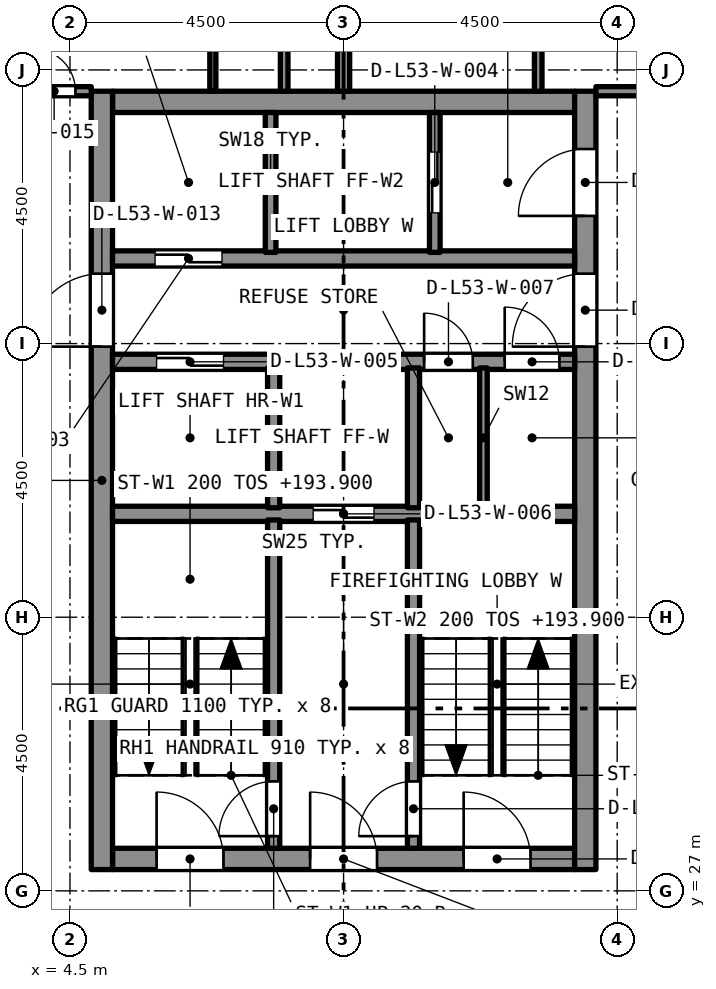
"""IFC4 building model, lengths in metres.
Left out: names, types, materials, properties, quantities, classifications, styles, units other than length and angle.
Written with IfcOpenShell. Run it as: python <this file> out.ifc"""

import sys

from ifc_helpers import new_model, si_unit, direction, frame, frame_2d, origin, place, context, subcontext, project, spatial, rectangle, extrude, element, fill, save


model = new_model("IFC4")
c1 = context("Model", 3, precision=1e-05, world=origin(), true_north=direction((0.0, 1.0)))
c2 = subcontext(c1, "Body", "Model", "MODEL_VIEW")
j1 = project(units=[si_unit("LENGTHUNIT", "METRE"), si_unit("PLANEANGLEUNIT", "RADIAN")], contexts=[c1])
p1 = place(None, origin())
s1 = spatial("IfcSite", under=j1, at=p1, CompositionType="ELEMENT")
p2 = place(p1, origin())
s2 = spatial("IfcBuilding", under=s1, at=p2, CompositionType="ELEMENT")
p3 = place(p2, frame((0.0, 0.0, 192.3)))
s3 = spatial("IfcBuildingStorey", under=s2, at=p3, CompositionType="ELEMENT", Elevation=192.3)
p4 = place(p3, frame((5.2, 27.525, 0.0), z_axis=(0.0, 0.0, 1.0), x_axis=(1.0, 0.0, 0.0)))
e1 = element("IfcWall", 1, at=p4, inside=s3, PredefinedType="SOLIDWALL", context=c2, shape_type="SweptSolid", body=[
    extrude(rectangle(XDim=7.6, YDim=0.35, at=frame_2d((3.8, 0.0))), origin(), (0.0, 0.0, 1.0), 3.2),
])
p5 = place(p4, frame((0.725, 0.0, 0.0)))
e2 = element("IfcOpeningElement", 2, at=p5, cuts=e1, PredefinedType="OPENING", context=c2, shape_type="SweptSolid", body=[
    extrude(rectangle(XDim=1.1, YDim=2.1, at=frame_2d((0.55, 1.05))), frame((0.0, 0.185, 0.0), z_axis=(0.0, -1.0, 0.0), x_axis=(1.0, 0.0, 0.0)), (0.0, 0.0, 1.0), 0.37),
])
p6 = place(p4, frame((3.25, 0.0, 0.0)))
e3 = element("IfcOpeningElement", 3, at=p6, cuts=e1, PredefinedType="OPENING", context=c2, shape_type="SweptSolid", body=[
    extrude(rectangle(XDim=1.1, YDim=2.1, at=frame_2d((0.55, 1.05))), frame((0.0, 0.185, 0.0), z_axis=(0.0, -1.0, 0.0), x_axis=(1.0, 0.0, 0.0)), (0.0, 0.0, 1.0), 0.37),
])
p7 = place(p4, frame((5.775, 0.0, 0.0)))
e4 = element("IfcOpeningElement", 4, at=p7, cuts=e1, PredefinedType="OPENING", context=c2, shape_type="SweptSolid", body=[
    extrude(rectangle(XDim=1.1, YDim=2.1, at=frame_2d((0.55, 1.05))), frame((0.0, 0.185, 0.0), z_axis=(0.0, -1.0, 0.0), x_axis=(1.0, 0.0, 0.0)), (0.0, 0.0, 1.0), 0.37),
])
p8 = place(p3, frame((5.2, 39.975, 0.0), z_axis=(0.0, 0.0, 1.0), x_axis=(1.0, 0.0, 0.0)))
e5 = element("IfcWall", 5, at=p8, inside=s3, PredefinedType="SOLIDWALL", context=c2, shape_type="SweptSolid", body=[
    extrude(rectangle(XDim=7.6, YDim=0.35, at=frame_2d((3.8, 0.0))), origin(), (0.0, 0.0, 1.0), 3.2),
])
p9 = place(p3, frame((5.025, 27.35, 0.0), z_axis=(0.0, 0.0, 1.0), x_axis=(0.0, 1.0, 0.0)))
e6 = element("IfcWall", 6, at=p9, inside=s3, PredefinedType="SOLIDWALL", context=c2, shape_type="SweptSolid", body=[
    extrude(rectangle(XDim=12.8, YDim=0.35, at=frame_2d((6.4, 0.0))), origin(), (0.0, 0.0, 1.0), 3.2),
])
p10 = place(p9, frame((8.6, 0.0, 0.0)))
e7 = element("IfcOpeningElement", 7, at=p10, cuts=e6, PredefinedType="OPENING", context=c2, shape_type="SweptSolid", body=[
    extrude(rectangle(XDim=1.2, YDim=2.1, at=frame_2d((0.6, 1.05))), frame((0.0, 0.185, 0.0), z_axis=(0.0, -1.0, 0.0), x_axis=(1.0, 0.0, 0.0)), (0.0, 0.0, 1.0), 0.37),
])
p11 = place(p3, frame((12.975, 27.35, 0.0), z_axis=(0.0, 0.0, 1.0), x_axis=(0.0, 1.0, 0.0)))
e8 = element("IfcWall", 8, at=p11, inside=s3, PredefinedType="SOLIDWALL", context=c2, shape_type="SweptSolid", body=[
    extrude(rectangle(XDim=12.8, YDim=0.35, at=frame_2d((6.4, 0.0))), origin(), (0.0, 0.0, 1.0), 3.2),
])
p12 = place(p11, frame((10.75, 0.0, 0.0)))
e9 = element("IfcOpeningElement", 9, at=p12, cuts=e8, PredefinedType="OPENING", context=c2, shape_type="SweptSolid", body=[
    extrude(rectangle(XDim=1.1, YDim=2.1, at=frame_2d((0.55, 1.05))), frame((0.0, 0.185, 0.0), z_axis=(0.0, -1.0, 0.0), x_axis=(1.0, 0.0, 0.0)), (0.0, 0.0, 1.0), 0.37),
])
p13 = place(p11, frame((8.6, 0.0, 0.0)))
e10 = element("IfcOpeningElement", 10, at=p13, cuts=e8, PredefinedType="OPENING", context=c2, shape_type="SweptSolid", body=[
    extrude(rectangle(XDim=1.2, YDim=2.1, at=frame_2d((0.6, 1.05))), frame((0.0, 0.185, 0.0), z_axis=(0.0, -1.0, 0.0), x_axis=(1.0, 0.0, 0.0)), (0.0, 0.0, 1.0), 0.37),
])
p14 = place(p3, frame((8.023, 40.15, 0.0), z_axis=(0.0, 0.0, 1.0), x_axis=(0.0, 1.0, 0.0)))
e11 = element("IfcWall", 11, at=p14, inside=s3, PredefinedType="PARTITIONING", context=c2, shape_type="SweptSolid", body=[
    extrude(rectangle(XDim=3.408, YDim=0.125, at=frame_2d((1.704, 0.0))), origin(), (0.0, 0.0, 1.0), 2.9),
])
p15 = place(p3, frame((9.0, 40.15, 0.0), z_axis=(0.0, 0.0, 1.0), x_axis=(0.0, 1.0, 0.0)))
e12 = element("IfcWall", 12, at=p15, inside=s3, PredefinedType="PARTITIONING", context=c2, shape_type="SweptSolid", body=[
    extrude(rectangle(XDim=3.47, YDim=0.2, at=frame_2d((1.735, 0.0))), origin(), (0.0, 0.0, 1.0), 2.9),
])
p16 = place(p3, frame((6.85, 40.15, 0.0), z_axis=(0.0, 0.0, 1.0), x_axis=(0.0, 1.0, 0.0)))
e13 = element("IfcWall", 13, at=p16, inside=s3, PredefinedType="PARTITIONING", context=c2, shape_type="SweptSolid", body=[
    extrude(rectangle(XDim=3.42, YDim=0.1, at=frame_2d((1.71, 0.0))), origin(), (0.0, 0.0, 1.0), 2.9),
])
p17 = place(p3, frame((3.65, 40.15, 0.0), z_axis=(0.0, 0.0, 1.0), x_axis=(1.0, 0.0, 0.0)))
e14 = element("IfcWall", 14, at=p17, inside=s3, PredefinedType="PARTITIONING", context=c2, shape_type="SweptSolid", body=[
    extrude(rectangle(XDim=1.2, YDim=0.15, at=frame_2d((0.6, 0.0))), origin(), (0.0, 0.0, 1.0), 2.9),
])
p18 = place(p17, frame((0.24, 0.0, 0.0)))
e15 = element("IfcOpeningElement", 15, at=p18, cuts=e14, PredefinedType="OPENING", context=c2, shape_type="SweptSolid", body=[
    extrude(rectangle(XDim=0.7, YDim=2.1, at=frame_2d((0.35, 1.05))), frame((0.0, 0.085, 0.0), z_axis=(0.0, -1.0, 0.0), x_axis=(1.0, 0.0, 0.0)), (0.0, 0.0, 1.0), 0.17),
])
p19 = place(p3, frame((12.201, 40.15, 0.0), z_axis=(0.0, 0.0, 1.0), x_axis=(0.0, 1.0, 0.0)))
e16 = element("IfcWall", 16, at=p19, inside=s3, PredefinedType="PARTITIONING", context=c2, shape_type="SweptSolid", body=[
    extrude(rectangle(XDim=3.528, YDim=0.125, at=frame_2d((1.764, 0.0))), origin(), (0.0, 0.0, 1.0), 2.9),
])
p20 = place(p3, frame((13.15, 40.15, 0.0), z_axis=(0.0, 0.0, 1.0), x_axis=(1.0, 0.0, 0.0)))
e17 = element("IfcWall", 17, at=p20, inside=s3, PredefinedType="PARTITIONING", context=c2, shape_type="SweptSolid", body=[
    extrude(rectangle(XDim=1.8, YDim=0.15, at=frame_2d((0.9, 0.0))), origin(), (0.0, 0.0, 1.0), 2.9),
])
p21 = place(p3, frame((5.2, 33.2, 0.0), z_axis=(0.0, 0.0, 1.0), x_axis=(1.0, 0.0, 0.0)))
e18 = element("IfcWall", 18, at=p21, inside=s3, PredefinedType="SOLIDWALL", context=c2, shape_type="SweptSolid", body=[
    extrude(rectangle(XDim=7.6, YDim=0.25, at=frame_2d((3.8, 0.0))), origin(), (0.0, 0.0, 1.0), 2.9),
])
p22 = place(p21, frame((3.3, 0.0, 0.0)))
e19 = element("IfcOpeningElement", 19, at=p22, cuts=e18, PredefinedType="OPENING", context=c2, shape_type="SweptSolid", body=[
    extrude(rectangle(XDim=1.0, YDim=2.1, at=frame_2d((0.5, 1.05))), frame((0.0, 0.135, 0.0), z_axis=(0.0, -1.0, 0.0), x_axis=(1.0, 0.0, 0.0)), (0.0, 0.0, 1.0), 0.27),
])
p23 = place(p3, frame((5.2, 35.7, 0.0), z_axis=(0.0, 0.0, 1.0), x_axis=(1.0, 0.0, 0.0)))
e20 = element("IfcWall", 20, at=p23, inside=s3, PredefinedType="SOLIDWALL", context=c2, shape_type="SweptSolid", body=[
    extrude(rectangle(XDim=7.6, YDim=0.25, at=frame_2d((3.8, 0.0))), origin(), (0.0, 0.0, 1.0), 2.9),
])
p24 = place(p23, frame((0.725, 0.0, 0.0)))
e21 = element("IfcOpeningElement", 21, at=p24, cuts=e20, PredefinedType="OPENING", context=c2, shape_type="SweptSolid", body=[
    extrude(rectangle(XDim=1.1, YDim=2.4, at=frame_2d((0.55, 1.2))), frame((0.0, 0.135, 0.0), z_axis=(0.0, -1.0, 0.0), x_axis=(1.0, 0.0, 0.0)), (0.0, 0.0, 1.0), 0.27),
])
p25 = place(p23, frame((5.125, 0.0, 0.0)))
e22 = element("IfcOpeningElement", 22, at=p25, cuts=e20, PredefinedType="OPENING", context=c2, shape_type="SweptSolid", body=[
    extrude(rectangle(XDim=0.8, YDim=2.1, at=frame_2d((0.4, 1.05))), frame((0.0, 0.135, 0.0), z_axis=(0.0, -1.0, 0.0), x_axis=(1.0, 0.0, 0.0)), (0.0, 0.0, 1.0), 0.27),
])
p26 = place(p23, frame((6.45, 0.0, 0.0)))
e23 = element("IfcOpeningElement", 23, at=p26, cuts=e20, PredefinedType="OPENING", context=c2, shape_type="SweptSolid", body=[
    extrude(rectangle(XDim=0.9, YDim=2.1, at=frame_2d((0.45, 1.05))), frame((0.0, 0.135, 0.0), z_axis=(0.0, -1.0, 0.0), x_axis=(1.0, 0.0, 0.0)), (0.0, 0.0, 1.0), 0.27),
])
p27 = place(p3, frame((5.2, 37.4, 0.0), z_axis=(0.0, 0.0, 1.0), x_axis=(1.0, 0.0, 0.0)))
e24 = element("IfcWall", 24, at=p27, inside=s3, PredefinedType="SOLIDWALL", context=c2, shape_type="SweptSolid", body=[
    extrude(rectangle(XDim=7.6, YDim=0.25, at=frame_2d((3.8, 0.0))), origin(), (0.0, 0.0, 1.0), 2.9),
])
p28 = place(p27, frame((0.7, 0.0, 0.0)))
e25 = element("IfcOpeningElement", 25, at=p28, cuts=e24, PredefinedType="OPENING", context=c2, shape_type="SweptSolid", body=[
    extrude(rectangle(XDim=1.1, YDim=2.4, at=frame_2d((0.55, 1.2))), frame((0.0, 0.135, 0.0), z_axis=(0.0, -1.0, 0.0), x_axis=(1.0, 0.0, 0.0)), (0.0, 0.0, 1.0), 0.27),
])
p29 = place(p3, frame((7.85, 27.7, 0.0), z_axis=(0.0, 0.0, 1.0), x_axis=(0.0, 1.0, 0.0)))
e26 = element("IfcWall", 26, at=p29, inside=s3, PredefinedType="SOLIDWALL", context=c2, shape_type="SweptSolid", body=[
    extrude(rectangle(XDim=5.4, YDim=0.2, at=frame_2d((2.7, 0.0))), origin(), (0.0, 0.0, 1.0), 2.9),
])
p30 = place(p29, frame((0.2, 0.0, 0.0)))
e27 = element("IfcOpeningElement", 27, at=p30, cuts=e26, PredefinedType="OPENING", context=c2, shape_type="SweptSolid", body=[
    extrude(rectangle(XDim=0.9, YDim=2.1, at=frame_2d((0.45, 1.05))), frame((0.0, 0.11, 0.0), z_axis=(0.0, -1.0, 0.0), x_axis=(1.0, 0.0, 0.0)), (0.0, 0.0, 1.0), 0.22),
])
p31 = place(p3, frame((10.15, 27.7, 0.0), z_axis=(0.0, 0.0, 1.0), x_axis=(0.0, 1.0, 0.0)))
e28 = element("IfcWall", 28, at=p31, inside=s3, PredefinedType="SOLIDWALL", context=c2, shape_type="SweptSolid", body=[
    extrude(rectangle(XDim=5.4, YDim=0.2, at=frame_2d((2.7, 0.0))), origin(), (0.0, 0.0, 1.0), 2.9),
])
p32 = place(p31, frame((0.2, 0.0, 0.0)))
e29 = element("IfcOpeningElement", 29, at=p32, cuts=e28, PredefinedType="OPENING", context=c2, shape_type="SweptSolid", body=[
    extrude(rectangle(XDim=0.9, YDim=2.1, at=frame_2d((0.45, 1.05))), frame((0.0, 0.11, 0.0), z_axis=(0.0, -1.0, 0.0), x_axis=(1.0, 0.0, 0.0)), (0.0, 0.0, 1.0), 0.22),
])
for number, where, z_axis, x_axis in (
    (30, (7.85, 33.3, 0.0), (0.0, 0.0, 1.0), (0.0, 1.0, 0.0)),
    (31, (10.15, 33.3, 0.0), (0.0, 0.0, 1.0), (0.0, 1.0, 0.0)),
):
    element("IfcWall", number, at=place(p3, frame(where, z_axis=z_axis, x_axis=x_axis)), inside=s3, PredefinedType="SOLIDWALL", context=c2, shape_type="SweptSolid", body=[
        extrude(rectangle(XDim=2.3, YDim=0.2, at=frame_2d((1.15, 0.0))), origin(), (0.0, 0.0, 1.0), 2.9),
    ])
p33 = place(p3, frame((7.8, 37.5, 0.0), z_axis=(0.0, 0.0, 1.0), x_axis=(0.0, 1.0, 0.0)))
e32 = element("IfcWall", 32, at=p33, inside=s3, PredefinedType="SOLIDWALL", context=c2, shape_type="SweptSolid", body=[
    extrude(rectangle(XDim=2.3, YDim=0.175, at=frame_2d((1.15, 0.0))), origin(), (0.0, 0.0, 1.0), 2.9),
])
p34 = place(p3, frame((10.5, 37.5, 0.0), z_axis=(0.0, 0.0, 1.0), x_axis=(0.0, 1.0, 0.0)))
e33 = element("IfcWall", 33, at=p34, inside=s3, PredefinedType="SOLIDWALL", context=c2, shape_type="SweptSolid", body=[
    extrude(rectangle(XDim=2.3, YDim=0.175, at=frame_2d((1.15, 0.0))), origin(), (0.0, 0.0, 1.0), 2.9),
])
p35 = place(p34, frame((0.65, 0.0, 0.0)))
e34 = element("IfcOpeningElement", 34, at=p35, cuts=e33, PredefinedType="OPENING", context=c2, shape_type="SweptSolid", body=[
    extrude(rectangle(XDim=1.0, YDim=2.1, at=frame_2d((0.5, 1.05))), frame((0.0, 0.097, 0.0), z_axis=(0.0, -1.0, 0.0), x_axis=(1.0, 0.0, 0.0)), (0.0, 0.0, 1.0), 0.195),
])
p36 = place(p3, frame((11.3, 33.3, 0.0), z_axis=(0.0, 0.0, 1.0), x_axis=(0.0, 1.0, 0.0)))
e35 = element("IfcWall", 35, at=p36, inside=s3, PredefinedType="PARTITIONING", context=c2, shape_type="SweptSolid", body=[
    extrude(rectangle(XDim=2.3, YDim=0.125, at=frame_2d((1.15, 0.0))), origin(), (0.0, 0.0, 1.0), 2.9),
])
p37 = place(p18, origin())
e36 = element("IfcDoor", 36, at=p37, inside=s3, OperationType="SINGLE_SWING_LEFT", PredefinedType="DOOR", context=c2, shape_type="SweptSolid", body=[
    extrude(rectangle(XDim=0.7, YDim=2.1, at=frame_2d((0.35, 1.05))), frame((0.0, 0.025, 0.0), z_axis=(0.0, -1.0, 0.0), x_axis=(1.0, 0.0, 0.0)), (0.0, 0.0, 1.0), 0.05),
])
fill(e15, e36)
p38 = place(p30, origin())
e37 = element("IfcDoor", 37, at=p38, inside=s3, OperationType="SINGLE_SWING_LEFT", PredefinedType="DOOR", context=c2, shape_type="SweptSolid", body=[
    extrude(rectangle(XDim=0.9, YDim=2.1, at=frame_2d((0.45, 1.05))), frame((0.0, 0.025, 0.0), z_axis=(0.0, -1.0, 0.0), x_axis=(1.0, 0.0, 0.0)), (0.0, 0.0, 1.0), 0.05),
])
fill(e27, e37)
p39 = place(p32, origin())
e38 = element("IfcDoor", 38, at=p39, inside=s3, OperationType="SINGLE_SWING_LEFT", PredefinedType="DOOR", context=c2, shape_type="SweptSolid", body=[
    extrude(rectangle(XDim=0.9, YDim=2.1, at=frame_2d((0.45, 1.05))), frame((0.0, 0.025, 0.0), z_axis=(0.0, -1.0, 0.0), x_axis=(1.0, 0.0, 0.0)), (0.0, 0.0, 1.0), 0.05),
])
fill(e29, e38)
p40 = place(p28, origin())
e39 = element("IfcDoor", 39, at=p40, inside=s3, OperationType="SLIDING_TO_LEFT", PredefinedType="DOOR", context=c2, shape_type="SweptSolid", body=[
    extrude(rectangle(XDim=1.1, YDim=2.4, at=frame_2d((0.55, 1.2))), frame((0.0, 0.025, 0.0), z_axis=(0.0, -1.0, 0.0), x_axis=(1.0, 0.0, 0.0)), (0.0, 0.0, 1.0), 0.05),
])
fill(e25, e39)
p41 = place(p35, origin())
e40 = element("IfcDoor", 40, at=p41, inside=s3, OperationType="SLIDING_TO_LEFT", PredefinedType="DOOR", context=c2, shape_type="SweptSolid", body=[
    extrude(rectangle(XDim=1.0, YDim=2.1, at=frame_2d((0.5, 1.05))), frame((0.0, 0.025, 0.0), z_axis=(0.0, -1.0, 0.0), x_axis=(1.0, 0.0, 0.0)), (0.0, 0.0, 1.0), 0.05),
])
fill(e34, e40)
p42 = place(p24, origin())
e41 = element("IfcDoor", 41, at=p42, inside=s3, OperationType="SLIDING_TO_LEFT", PredefinedType="DOOR", context=c2, shape_type="SweptSolid", body=[
    extrude(rectangle(XDim=1.1, YDim=2.4, at=frame_2d((0.55, 1.2))), frame((0.0, 0.025, 0.0), z_axis=(0.0, -1.0, 0.0), x_axis=(1.0, 0.0, 0.0)), (0.0, 0.0, 1.0), 0.05),
])
fill(e21, e41)
p43 = place(p22, origin())
e42 = element("IfcDoor", 42, at=p43, inside=s3, OperationType="SLIDING_TO_LEFT", PredefinedType="DOOR", context=c2, shape_type="SweptSolid", body=[
    extrude(rectangle(XDim=1.0, YDim=2.1, at=frame_2d((0.5, 1.05))), frame((0.0, 0.025, 0.0), z_axis=(0.0, -1.0, 0.0), x_axis=(1.0, 0.0, 0.0)), (0.0, 0.0, 1.0), 0.05),
])
fill(e19, e42)
p44 = place(p25, origin())
e43 = element("IfcDoor", 43, at=p44, inside=s3, OperationType="SINGLE_SWING_LEFT", PredefinedType="DOOR", context=c2, shape_type="SweptSolid", body=[
    extrude(rectangle(XDim=0.8, YDim=2.1, at=frame_2d((0.4, 1.05))), frame((0.0, 0.025, 0.0), z_axis=(0.0, -1.0, 0.0), x_axis=(1.0, 0.0, 0.0)), (0.0, 0.0, 1.0), 0.05),
])
fill(e22, e43)
p45 = place(p26, origin())
e44 = element("IfcDoor", 44, at=p45, inside=s3, OperationType="SINGLE_SWING_LEFT", PredefinedType="DOOR", context=c2, shape_type="SweptSolid", body=[
    extrude(rectangle(XDim=0.9, YDim=2.1, at=frame_2d((0.45, 1.05))), frame((0.0, 0.025, 0.0), z_axis=(0.0, -1.0, 0.0), x_axis=(1.0, 0.0, 0.0)), (0.0, 0.0, 1.0), 0.05),
])
fill(e23, e44)
p46 = place(p5, origin())
e45 = element("IfcDoor", 45, at=p46, inside=s3, OperationType="SINGLE_SWING_LEFT", PredefinedType="DOOR", context=c2, shape_type="SweptSolid", body=[
    extrude(rectangle(XDim=1.1, YDim=2.1, at=frame_2d((0.55, 1.05))), frame((0.0, 0.025, 0.0), z_axis=(0.0, -1.0, 0.0), x_axis=(1.0, 0.0, 0.0)), (0.0, 0.0, 1.0), 0.05),
])
fill(e2, e45)
p47 = place(p6, origin())
e46 = element("IfcDoor", 46, at=p47, inside=s3, OperationType="SINGLE_SWING_LEFT", PredefinedType="DOOR", context=c2, shape_type="SweptSolid", body=[
    extrude(rectangle(XDim=1.1, YDim=2.1, at=frame_2d((0.55, 1.05))), frame((0.0, 0.025, 0.0), z_axis=(0.0, -1.0, 0.0), x_axis=(1.0, 0.0, 0.0)), (0.0, 0.0, 1.0), 0.05),
])
fill(e3, e46)
p48 = place(p7, origin())
e47 = element("IfcDoor", 47, at=p48, inside=s3, OperationType="SINGLE_SWING_LEFT", PredefinedType="DOOR", context=c2, shape_type="SweptSolid", body=[
    extrude(rectangle(XDim=1.1, YDim=2.1, at=frame_2d((0.55, 1.05))), frame((0.0, 0.025, 0.0), z_axis=(0.0, -1.0, 0.0), x_axis=(1.0, 0.0, 0.0)), (0.0, 0.0, 1.0), 0.05),
])
fill(e4, e47)
p49 = place(p12, origin())
e48 = element("IfcDoor", 48, at=p49, inside=s3, OperationType="SINGLE_SWING_LEFT", PredefinedType="DOOR", context=c2, shape_type="SweptSolid", body=[
    extrude(rectangle(XDim=1.1, YDim=2.1, at=frame_2d((0.55, 1.05))), frame((0.0, 0.025, 0.0), z_axis=(0.0, -1.0, 0.0), x_axis=(1.0, 0.0, 0.0)), (0.0, 0.0, 1.0), 0.05),
])
fill(e9, e48)
p50 = place(p10, origin())
e49 = element("IfcDoor", 49, at=p50, inside=s3, OperationType="SINGLE_SWING_LEFT", PredefinedType="DOOR", context=c2, shape_type="SweptSolid", body=[
    extrude(rectangle(XDim=1.2, YDim=2.1, at=frame_2d((0.6, 1.05))), frame((0.0, 0.025, 0.0), z_axis=(0.0, -1.0, 0.0), x_axis=(1.0, 0.0, 0.0)), (0.0, 0.0, 1.0), 0.05),
])
fill(e7, e49)
p51 = place(p13, origin())
e50 = element("IfcDoor", 50, at=p51, inside=s3, OperationType="SINGLE_SWING_LEFT", PredefinedType="DOOR", context=c2, shape_type="SweptSolid", body=[
    extrude(rectangle(XDim=1.2, YDim=2.1, at=frame_2d((0.6, 1.05))), frame((0.0, 0.025, 0.0), z_axis=(0.0, -1.0, 0.0), x_axis=(1.0, 0.0, 0.0)), (0.0, 0.0, 1.0), 0.05),
])
fill(e10, e50)
save(model, sys.argv[1])
